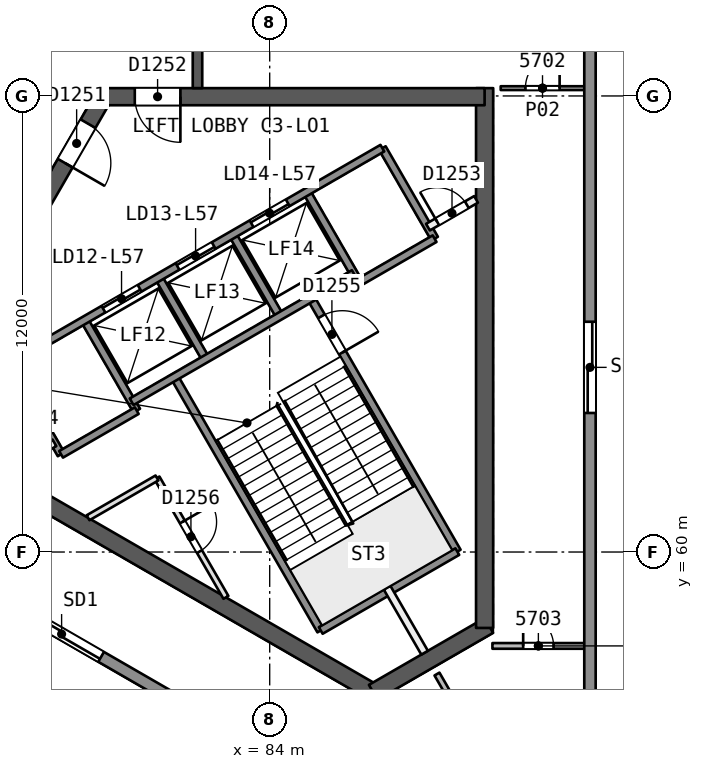
"""IFC4 building model, lengths in metres.
Left out: names, types, materials, properties, quantities, classifications, styles, units other than length and angle.
Written with IfcOpenShell. Run it as: python <this file> out.ifc"""

import sys

from ifc_helpers import new_model, si_unit, direction, frame, frame_2d, origin, place, context, subcontext, project, spatial, rectangle, extrude, element, fill, save


model = new_model("IFC4")
c1 = context("Model", 3, precision=1e-05, world=origin(), true_north=direction((0.0, 1.0)))
c2 = subcontext(c1, "Body", "Model", "MODEL_VIEW")
j1 = project(units=[si_unit("LENGTHUNIT", "METRE"), si_unit("PLANEANGLEUNIT", "RADIAN")], contexts=[c1])
p1 = place(None, origin())
s1 = spatial("IfcSite", under=j1, at=p1, CompositionType="ELEMENT")
p2 = place(p1, origin())
s2 = spatial("IfcBuilding", under=s1, at=p2, CompositionType="ELEMENT")
p3 = place(p2, frame((0.0, 0.0, 231.7)))
s3 = spatial("IfcBuildingStorey", under=s2, at=p3, CompositionType="ELEMENT", Elevation=231.7)
p4 = place(p3, frame((79.63, 71.981, 0.0), z_axis=(0.0, 0.0, 1.0), x_axis=(-0.500002171595, -0.86602415001, 0.0)))
e1 = element("IfcWall", 1, at=p4, inside=s3, PredefinedType="SHEAR", context=c2, shape_type="SweptSolid", body=[
    extrude(rectangle(XDim=10.25, YDim=0.45, at=frame_2d((5.125, 0.0))), origin(), (0.0, 0.0, 1.0), 3.7),
])
p5 = place(p4, frame((0.82, 0.0, 0.0)))
e2 = element("IfcOpeningElement", 2, at=p5, cuts=e1, PredefinedType="OPENING", context=c2, shape_type="SweptSolid", body=[
    extrude(rectangle(XDim=1.2, YDim=2.1, at=frame_2d((0.6, 1.05))), frame((0.0, 0.235, 0.0), z_axis=(0.0, -1.0, 0.0), x_axis=(1.0, 0.0, 0.0)), (0.0, 0.0, 1.0), 0.471),
])
p6 = place(p3, frame((74.617, 63.299, 0.0), z_axis=(0.0, 0.0, 1.0), x_axis=(0.86602594008, -0.499999071108, 0.0)))
e3 = element("IfcWall", 3, at=p6, inside=s3, PredefinedType="SHEAR", context=c2, shape_type="SweptSolid", body=[
    extrude(rectangle(XDim=14.108, YDim=0.45, at=frame_2d((7.054, 0.0))), origin(), (0.0, 0.0, 1.0), 3.7),
])
p7 = place(p3, frame((86.723, 56.31, 0.0), z_axis=(0.0, 0.0, 1.0), x_axis=(0.866042179588, 0.49997094233, 0.0)))
e4 = element("IfcWall", 4, at=p7, inside=s3, PredefinedType="SHEAR", context=c2, shape_type="SweptSolid", body=[
    extrude(rectangle(XDim=3.515, YDim=0.45, at=frame_2d((1.758, 0.0))), origin(), (0.0, 0.0, 1.0), 3.7),
])
p8 = place(p3, frame((89.655, 58.002, 0.0), z_axis=(0.0, 0.0, 1.0), x_axis=(0.0, 1.0, 0.0)))
e5 = element("IfcWall", 5, at=p8, inside=s3, PredefinedType="SHEAR", context=c2, shape_type="SweptSolid", body=[
    extrude(rectangle(XDim=14.204, YDim=0.45, at=frame_2d((7.102, 0.0))), origin(), (0.0, 0.0, 1.0), 3.7),
])
p9 = place(p3, frame((89.655, 71.981, 0.0), z_axis=(0.0, 0.0, 1.0), x_axis=(-1.0, 0.0, 0.0)))
e6 = element("IfcWall", 6, at=p9, inside=s3, PredefinedType="SHEAR", context=c2, shape_type="SweptSolid", body=[
    extrude(rectangle(XDim=10.155, YDim=0.45, at=frame_2d((5.078, 0.0))), origin(), (0.0, 0.0, 1.0), 3.7),
])
p10 = place(p9, frame((8.005, 0.0, 0.0)))
e7 = element("IfcOpeningElement", 7, at=p10, cuts=e6, PredefinedType="OPENING", context=c2, shape_type="SweptSolid", body=[
    extrude(rectangle(XDim=1.2, YDim=2.1, at=frame_2d((0.6, 1.05))), frame((0.0, 0.235, 0.0), z_axis=(0.0, -1.0, 0.0), x_axis=(1.0, 0.0, 0.0)), (0.0, 0.0, 1.0), 0.471),
])
p11 = place(p3, frame((82.1, 72.206, 0.0), z_axis=(0.0, 0.0, 1.0), x_axis=(0.0, 1.0, 0.0)))
e8 = element("IfcWall", 8, at=p11, inside=s3, PredefinedType="SHEAR", context=c2, shape_type="SweptSolid", body=[
    extrude(rectangle(XDim=15.588, YDim=0.25, at=frame_2d((7.794, 0.0))), origin(), (0.0, 0.0, 1.0), 3.3),
])
p12 = place(p11, frame((2.15, 0.0, 0.0)))
e9 = element("IfcOpeningElement", 9, at=p12, cuts=e8, PredefinedType="OPENING", context=c2, shape_type="SweptSolid", body=[
    extrude(rectangle(XDim=1.0, YDim=2.1, at=frame_2d((0.5, 1.05))), frame((0.0, 0.135, 0.0), z_axis=(0.0, -1.0, 0.0), x_axis=(1.0, 0.0, 0.0)), (0.0, 0.0, 1.0), 0.271),
])
p13 = place(p11, frame((7.662, 0.0, 0.0)))
e10 = element("IfcOpeningElement", 10, at=p13, cuts=e8, PredefinedType="OPENING", context=c2, shape_type="SweptSolid", body=[
    extrude(rectangle(XDim=1.2, YDim=2.4, at=frame_2d((0.6, 1.2))), frame((0.0, 0.135, 0.0), z_axis=(0.0, -1.0, 0.0), x_axis=(1.0, 0.0, 0.0)), (0.0, 0.0, 1.0), 0.271),
])
p14 = place(p11, frame((11.606, 0.0, 0.0)))
e11 = element("IfcOpeningElement", 11, at=p14, cuts=e8, PredefinedType="OPENING", context=c2, shape_type="SweptSolid", body=[
    extrude(rectangle(XDim=1.0, YDim=2.1, at=frame_2d((0.5, 1.05))), frame((0.0, 0.135, 0.0), z_axis=(0.0, -1.0, 0.0), x_axis=(1.0, 0.0, 0.0)), (0.0, 0.0, 1.0), 0.271),
])
p15 = place(p3, frame((90.079, 72.206, 0.0), z_axis=(0.0, 0.0, 1.0), x_axis=(1.0, 0.0, 0.0)))
e12 = element("IfcWall", 12, at=p15, inside=s3, PredefinedType="PARTITIONING", context=c2, shape_type="SweptSolid", body=[
    extrude(rectangle(XDim=2.2, YDim=0.1, at=frame_2d((1.1, 0.0))), origin(), (0.0, 0.0, 1.0), 3.3),
])
p16 = place(p15, frame((0.65, 0.0, 0.0)))
e13 = element("IfcOpeningElement", 13, at=p16, cuts=e12, PredefinedType="OPENING", context=c2, shape_type="SweptSolid", body=[
    extrude(rectangle(XDim=0.9, YDim=2.1, at=frame_2d((0.45, 1.05))), frame((0.0, 0.061, 0.0), z_axis=(0.0, -1.0, 0.0), x_axis=(1.0, 0.0, 0.0)), (0.0, 0.0, 1.0), 0.121),
])
p17 = place(p3, frame((89.861, 57.529, 0.0), z_axis=(0.0, 0.0, 1.0), x_axis=(1.0, 0.0, 0.0)))
e14 = element("IfcWall", 14, at=p17, inside=s3, PredefinedType="PARTITIONING", context=c2, shape_type="SweptSolid", body=[
    extrude(rectangle(XDim=2.418, YDim=0.15, at=frame_2d((1.209, 0.0))), origin(), (0.0, 0.0, 1.0), 3.3),
])
p18 = place(p17, frame((0.809, 0.0, 0.0)))
e15 = element("IfcOpeningElement", 15, at=p18, cuts=e14, PredefinedType="OPENING", context=c2, shape_type="SweptSolid", body=[
    extrude(rectangle(XDim=0.8, YDim=2.1, at=frame_2d((0.4, 1.05))), frame((0.0, 0.085, 0.0), z_axis=(0.0, -1.0, 0.0), x_axis=(1.0, 0.0, 0.0)), (0.0, 0.0, 1.0), 0.171),
])
p19 = place(p3, frame((88.402, 56.789, 0.0), z_axis=(0.0, 0.0, 1.0), x_axis=(0.500019299785, -0.866014260761, 0.0)))
e16 = element("IfcWall", 16, at=p19, inside=s3, PredefinedType="PARTITIONING", context=c2, shape_type="SweptSolid", body=[
    extrude(rectangle(XDim=3.465, YDim=0.15, at=frame_2d((1.732, 0.0))), origin(), (0.0, 0.0, 1.0), 3.3),
])
p20 = place(p3, frame((92.428, 105.059, 0.0), z_axis=(0.0, 0.0, 1.0), x_axis=(0.0, -1.0, 0.0)))
e17 = element("IfcWall", 17, at=p20, inside=s3, PredefinedType="SOLIDWALL", context=c2, shape_type="SweptSolid", body=[
    extrude(rectangle(XDim=50.118, YDim=0.3, at=frame_2d((25.059, 0.0))), origin(), (0.0, 0.0, 1.0), 3.3),
])
p21 = place(p20, frame((29.003, 0.0, 0.0)))
e18 = element("IfcOpeningElement", 18, at=p21, cuts=e17, PredefinedType="OPENING", context=c2, shape_type="SweptSolid", body=[
    extrude(rectangle(XDim=2.4, YDim=2.4, at=frame_2d((1.2, 1.2))), frame((0.0, 0.161, 0.0), z_axis=(0.0, -1.0, 0.0), x_axis=(1.0, 0.0, 0.0)), (0.0, 0.0, 1.0), 0.321),
])
p22 = place(p20, frame((39.0, 0.0, 0.0)))
e19 = element("IfcOpeningElement", 19, at=p22, cuts=e17, PredefinedType="OPENING", context=c2, shape_type="SweptSolid", body=[
    extrude(rectangle(XDim=2.4, YDim=2.4, at=frame_2d((1.2, 1.2))), frame((0.0, 0.161, 0.0), z_axis=(0.0, -1.0, 0.0), x_axis=(1.0, 0.0, 0.0)), (0.0, 0.0, 1.0), 0.321),
])
p23 = place(p20, frame((9.572, 0.0, 0.0)))
e20 = element("IfcOpeningElement", 20, at=p23, cuts=e17, PredefinedType="OPENING", context=c2, shape_type="SweptSolid", body=[
    extrude(rectangle(XDim=2.4, YDim=2.4, at=frame_2d((1.2, 1.2))), frame((0.0, 0.161, 0.0), z_axis=(0.0, -1.0, 0.0), x_axis=(1.0, 0.0, 0.0)), (0.0, 0.0, 1.0), 0.321),
])
p24 = place(p20, frame((23.391, 0.0, 0.0)))
e21 = element("IfcOpeningElement", 21, at=p24, cuts=e17, PredefinedType="OPENING", context=c2, shape_type="SweptSolid", body=[
    extrude(rectangle(XDim=2.4, YDim=2.4, at=frame_2d((1.2, 1.2))), frame((0.0, 0.161, 0.0), z_axis=(0.0, -1.0, 0.0), x_axis=(1.0, 0.0, 0.0)), (0.0, 0.0, 1.0), 0.321),
])
p25 = place(p3, frame((87.988, 52.377, 0.0), z_axis=(0.0, 0.0, 1.0), x_axis=(-0.866023992326, 0.500002444709, 0.0)))
e22 = element("IfcWall", 22, at=p25, inside=s3, PredefinedType="SOLIDWALL", context=c2, shape_type="SweptSolid", body=[
    extrude(rectangle(XDim=50.118, YDim=0.3, at=frame_2d((25.059, 0.0))), origin(), (0.0, 0.0, 1.0), 3.3),
])
p26 = place(p25, frame((24.015, 0.0, 0.0)))
e23 = element("IfcOpeningElement", 23, at=p26, cuts=e22, PredefinedType="OPENING", context=c2, shape_type="SweptSolid", body=[
    extrude(rectangle(XDim=2.4, YDim=2.4, at=frame_2d((1.2, 1.2))), frame((0.0, 0.161, 0.0), z_axis=(0.0, -1.0, 0.0), x_axis=(1.0, 0.0, 0.0)), (0.0, 0.0, 1.0), 0.321),
])
p27 = place(p25, frame((38.146, 0.0, 0.0)))
e24 = element("IfcOpeningElement", 24, at=p27, cuts=e22, PredefinedType="OPENING", context=c2, shape_type="SweptSolid", body=[
    extrude(rectangle(XDim=2.4, YDim=2.4, at=frame_2d((1.2, 1.2))), frame((0.0, 0.161, 0.0), z_axis=(0.0, -1.0, 0.0), x_axis=(1.0, 0.0, 0.0)), (0.0, 0.0, 1.0), 0.321),
])
p28 = place(p25, frame((9.727, 0.0, 0.0)))
e25 = element("IfcOpeningElement", 25, at=p28, cuts=e22, PredefinedType="OPENING", context=c2, shape_type="SweptSolid", body=[
    extrude(rectangle(XDim=2.4, YDim=2.4, at=frame_2d((1.2, 1.2))), frame((0.0, 0.161, 0.0), z_axis=(0.0, -1.0, 0.0), x_axis=(1.0, 0.0, 0.0)), (0.0, 0.0, 1.0), 0.321),
])
p29 = place(p3, frame((77.135, 64.952, 0.0), z_axis=(0.0, 0.0, 1.0), x_axis=(0.499996545922, -0.866027397988, 0.0)))
e26 = element("IfcWall", 26, at=p29, inside=s3, PredefinedType="SOLIDWALL", context=c2, shape_type="SweptSolid", body=[
    extrude(rectangle(XDim=2.75, YDim=0.2, at=frame_2d((1.375, 0.0))), origin(), (0.0, 0.0, 1.0), 3.3),
])
p30 = place(p3, frame((81.034, 61.949, 0.0), z_axis=(0.0, 0.0, 1.0), x_axis=(0.499945732631, -0.866056732798, 0.0)))
e27 = element("IfcWall", 27, at=p30, inside=s3, PredefinedType="PARTITIONING", context=c2, shape_type="SweptSolid", body=[
    extrude(rectangle(XDim=3.628, YDim=0.15, at=frame_2d((1.814, 0.0))), origin(), (0.0, 0.0, 1.0), 3.3),
])
p31 = place(p30, frame((1.337, 0.0, 0.0)))
e28 = element("IfcOpeningElement", 28, at=p31, cuts=e27, PredefinedType="OPENING", context=c2, shape_type="SweptSolid", body=[
    extrude(rectangle(XDim=0.9, YDim=2.1, at=frame_2d((0.45, 1.05))), frame((0.0, 0.085, 0.0), z_axis=(0.0, -1.0, 0.0), x_axis=(1.0, 0.0, 0.0)), (0.0, 0.0, 1.0), 0.171),
])
p32 = place(p3, frame((79.127, 66.102, 0.0), z_axis=(0.0, 0.0, 1.0), x_axis=(0.499996545922, -0.866027397988, 0.0)))
e29 = element("IfcWall", 29, at=p32, inside=s3, PredefinedType="SOLIDWALL", context=c2, shape_type="SweptSolid", body=[
    extrude(rectangle(XDim=2.75, YDim=0.2, at=frame_2d((1.375, 0.0))), origin(), (0.0, 0.0, 1.0), 3.3),
])
p33 = place(p3, frame((81.493, 64.604, 0.0), z_axis=(0.0, 0.0, 1.0), x_axis=(0.500006057782, -0.866021906294, 0.0)))
e30 = element("IfcWall", 30, at=p33, inside=s3, PredefinedType="SOLIDWALL", context=c2, shape_type="SweptSolid", body=[
    extrude(rectangle(XDim=7.7, YDim=0.2, at=frame_2d((3.85, 0.0))), origin(), (0.0, 0.0, 1.0), 3.3),
])
p34 = place(p3, frame((81.076, 67.227, 0.0), z_axis=(0.0, 0.0, 1.0), x_axis=(0.50000366821, -0.866023285932, 0.0)))
e31 = element("IfcWall", 31, at=p34, inside=s3, PredefinedType="SOLIDWALL", context=c2, shape_type="SweptSolid", body=[
    extrude(rectangle(XDim=2.48, YDim=0.2, at=frame_2d((1.24, 0.0))), origin(), (0.0, 0.0, 1.0), 3.3),
])
p35 = place(p3, frame((87.09, 59.06, 0.0), z_axis=(0.0, 0.0, 1.0), x_axis=(0.500011643316, -0.866018681408, 0.0)))
e32 = element("IfcWall", 32, at=p35, inside=s3, PredefinedType="PARTITIONING", context=c2, shape_type="SweptSolid", body=[
    extrude(rectangle(XDim=1.973, YDim=0.2, at=frame_2d((0.987, 0.0))), origin(), (0.0, 0.0, 1.0), 3.3),
])
p36 = place(p3, frame((83.024, 68.352, 0.0), z_axis=(0.0, 0.0, 1.0), x_axis=(0.50000366821, -0.866023285932, 0.0)))
e33 = element("IfcWall", 33, at=p36, inside=s3, PredefinedType="SOLIDWALL", context=c2, shape_type="SweptSolid", body=[
    extrude(rectangle(XDim=2.48, YDim=0.2, at=frame_2d((1.24, 0.0))), origin(), (0.0, 0.0, 1.0), 3.3),
])
p37 = place(p3, frame((85.087, 66.679, 0.0), z_axis=(0.0, 0.0, 1.0), x_axis=(0.500019787375, -0.866013979237, 0.0)))
e34 = element("IfcWall", 34, at=p37, inside=s3, PredefinedType="SOLIDWALL", context=c2, shape_type="SweptSolid", body=[
    extrude(rectangle(XDim=7.7, YDim=0.2, at=frame_2d((3.85, 0.0))), origin(), (0.0, 0.0, 1.0), 3.3),
])
p38 = place(p37, frame((0.55, 0.0, 0.0)))
e35 = element("IfcOpeningElement", 35, at=p38, cuts=e34, PredefinedType="OPENING", context=c2, shape_type="SweptSolid", body=[
    extrude(rectangle(XDim=1.1, YDim=2.1, at=frame_2d((0.55, 1.05))), frame((0.0, 0.11, 0.0), z_axis=(0.0, -1.0, 0.0), x_axis=(1.0, 0.0, 0.0)), (0.0, 0.0, 1.0), 0.221),
])
for number, where, z_axis, x_axis in (
    (36, (84.973, 69.477, 0.0), (0.0, 0.0, 1.0), (0.5, -0.866, 0.0)),
    (37, (86.965, 70.626, 0.0), (0.0, 0.0, 1.0), (0.5, -0.866, 0.0)),
):
    element("IfcWall", number, at=place(p3, frame(where, z_axis=z_axis, x_axis=x_axis)), inside=s3, PredefinedType="SOLIDWALL", context=c2, shape_type="SweptSolid", body=[
        extrude(rectangle(XDim=2.75, YDim=0.2, at=frame_2d((1.375, 0.0))), origin(), (0.0, 0.0, 1.0), 3.3),
    ])
p39 = place(p3, frame((77.135, 64.952, 0.0), z_axis=(0.0, 0.0, 1.0), x_axis=(0.866031916153, 0.499988720078, 0.0)))
e38 = element("IfcWall", 38, at=p39, inside=s3, PredefinedType="SOLIDWALL", context=c2, shape_type="SweptSolid", body=[
    extrude(rectangle(XDim=11.35, YDim=0.2, at=frame_2d((5.675, 0.0))), origin(), (0.0, 0.0, 1.0), 3.3),
])
p40 = place(p39, frame((2.875, 0.0, 0.0)))
e39 = element("IfcOpeningElement", 39, at=p40, cuts=e38, PredefinedType="OPENING", context=c2, shape_type="SweptSolid", body=[
    extrude(rectangle(XDim=1.1, YDim=2.1, at=frame_2d((0.55, 1.05))), frame((0.0, 0.11, 0.0), z_axis=(0.0, -1.0, 0.0), x_axis=(1.0, 0.0, 0.0)), (0.0, 0.0, 1.0), 0.221),
])
p41 = place(p39, frame((5.125, 0.0, 0.0)))
e40 = element("IfcOpeningElement", 40, at=p41, cuts=e38, PredefinedType="OPENING", context=c2, shape_type="SweptSolid", body=[
    extrude(rectangle(XDim=1.1, YDim=2.1, at=frame_2d((0.55, 1.05))), frame((0.0, 0.11, 0.0), z_axis=(0.0, -1.0, 0.0), x_axis=(1.0, 0.0, 0.0)), (0.0, 0.0, 1.0), 0.221),
])
p42 = place(p39, frame((7.375, 0.0, 0.0)))
e41 = element("IfcOpeningElement", 41, at=p42, cuts=e38, PredefinedType="OPENING", context=c2, shape_type="SweptSolid", body=[
    extrude(rectangle(XDim=1.1, YDim=2.1, at=frame_2d((0.55, 1.05))), frame((0.0, 0.11, 0.0), z_axis=(0.0, -1.0, 0.0), x_axis=(1.0, 0.0, 0.0)), (0.0, 0.0, 1.0), 0.221),
])
p43 = place(p3, frame((77.07, 62.143, 0.0), z_axis=(0.0, 0.0, 1.0), x_axis=(0.866013036001, 0.500021421018, 0.0)))
e42 = element("IfcWall", 42, at=p43, inside=s3, PredefinedType="PARTITIONING", context=c2, shape_type="SweptSolid", body=[
    extrude(rectangle(XDim=1.461, YDim=0.2, at=frame_2d((0.73, 0.0))), origin(), (0.0, 0.0, 1.0), 3.3),
])
p44 = place(p43, frame((0.281, 0.0, 0.0)))
e43 = element("IfcOpeningElement", 43, at=p44, cuts=e42, PredefinedType="OPENING", context=c2, shape_type="SweptSolid", body=[
    extrude(rectangle(XDim=0.9, YDim=2.1, at=frame_2d((0.45, 1.05))), frame((0.0, 0.11, 0.0), z_axis=(0.0, -1.0, 0.0), x_axis=(1.0, 0.0, 0.0)), (0.0, 0.0, 1.0), 0.221),
])
p45 = place(p3, frame((88.165, 68.548, 0.0), z_axis=(0.0, 0.0, 1.0), x_axis=(0.866013036001, 0.500021421018, 0.0)))
e44 = element("IfcWall", 44, at=p45, inside=s3, PredefinedType="PARTITIONING", context=c2, shape_type="SweptSolid", body=[
    extrude(rectangle(XDim=1.461, YDim=0.2, at=frame_2d((0.73, 0.0))), origin(), (0.0, 0.0, 1.0), 3.3),
])
p46 = place(p45, frame((0.281, 0.0, 0.0)))
e45 = element("IfcOpeningElement", 45, at=p46, cuts=e44, PredefinedType="OPENING", context=c2, shape_type="SweptSolid", body=[
    extrude(rectangle(XDim=0.9, YDim=2.1, at=frame_2d((0.45, 1.05))), frame((0.0, 0.11, 0.0), z_axis=(0.0, -1.0, 0.0), x_axis=(1.0, 0.0, 0.0)), (0.0, 0.0, 1.0), 0.221),
])
p47 = place(p3, frame((80.367, 63.954, 0.0), z_axis=(0.0, 0.0, 1.0), x_axis=(0.866026575979, 0.499997969693, 0.0)))
e46 = element("IfcWall", 46, at=p47, inside=s3, PredefinedType="SOLIDWALL", context=c2, shape_type="SweptSolid", body=[
    extrude(rectangle(XDim=6.75, YDim=0.2, at=frame_2d((3.375, 0.0))), origin(), (0.0, 0.0, 1.0), 3.3),
])
p48 = place(p3, frame((78.51, 62.57, 0.0), z_axis=(0.0, 0.0, 1.0), x_axis=(0.866053019151, 0.499952165731, 0.0)))
e47 = element("IfcWall", 47, at=p48, inside=s3, PredefinedType="SOLIDWALL", context=c2, shape_type="SweptSolid", body=[
    extrude(rectangle(XDim=2.3, YDim=0.2, at=frame_2d((1.15, 0.0))), origin(), (0.0, 0.0, 1.0), 3.3),
])
p49 = place(p3, frame((86.348, 67.095, 0.0), z_axis=(0.0, 0.0, 1.0), x_axis=(0.86602648383, 0.499998129301, 0.0)))
e48 = element("IfcWall", 48, at=p49, inside=s3, PredefinedType="SOLIDWALL", context=c2, shape_type="SweptSolid", body=[
    extrude(rectangle(XDim=2.3, YDim=0.2, at=frame_2d((1.15, 0.0))), origin(), (0.0, 0.0, 1.0), 3.3),
])
p50 = place(p3, frame((79.22, 60.901, 0.0), z_axis=(0.0, 0.0, 1.0), x_axis=(0.866040030748, 0.499974664501, 0.0)))
e49 = element("IfcWall", 49, at=p50, inside=s3, PredefinedType="PARTITIONING", context=c2, shape_type="SweptSolid", body=[
    extrude(rectangle(XDim=2.095, YDim=0.15, at=frame_2d((1.047, 0.0))), origin(), (0.0, 0.0, 1.0), 3.3),
])
p51 = place(p3, frame((85.343, 57.935, 0.0), z_axis=(0.0, 0.0, 1.0), x_axis=(0.866004344652, 0.500036473714, 0.0)))
e50 = element("IfcWall", 50, at=p51, inside=s3, PredefinedType="SOLIDWALL", context=c2, shape_type="SweptSolid", body=[
    extrude(rectangle(XDim=4.15, YDim=0.2, at=frame_2d((2.075, 0.0))), origin(), (0.0, 0.0, 1.0), 3.3),
])
p52 = place(p3, frame((77.798, 73.154, 0.0), z_axis=(0.0, 0.0, 1.0), x_axis=(0.866041268327, 0.499972520799, 0.0)))
e51 = element("IfcWall", 51, at=p52, inside=s3, PredefinedType="PARTITIONING", context=c2, shape_type="SweptSolid", body=[
    extrude(rectangle(XDim=2.0, YDim=0.1, at=frame_2d((1.0, 0.0))), origin(), (0.0, 0.0, 1.0), 3.3),
])
p53 = place(p16, origin())
e52 = element("IfcDoor", 52, at=p53, inside=s3, OperationType="SINGLE_SWING_RIGHT", PredefinedType="NOTDEFINED", context=c2, shape_type="SweptSolid", body=[
    extrude(rectangle(XDim=0.9, YDim=2.1, at=frame_2d((0.45, 1.05))), frame((0.0, 0.025, 0.0), z_axis=(0.0, -1.0, 0.0), x_axis=(1.0, 0.0, 0.0)), (0.0, 0.0, 1.0), 0.05),
])
fill(e13, e52)
p54 = place(p18, origin())
e53 = element("IfcDoor", 53, at=p54, inside=s3, OperationType="SINGLE_SWING_LEFT", PredefinedType="NOTDEFINED", context=c2, shape_type="SweptSolid", body=[
    extrude(rectangle(XDim=0.8, YDim=2.1, at=frame_2d((0.4, 1.05))), frame((0.0, 0.025, 0.0), z_axis=(0.0, -1.0, 0.0), x_axis=(1.0, 0.0, 0.0)), (0.0, 0.0, 1.0), 0.05),
])
fill(e15, e53)
p55 = place(p22, origin())
e54 = element("IfcDoor", 54, at=p55, inside=s3, OperationType="SLIDING_TO_RIGHT", PredefinedType="NOTDEFINED", context=c2, shape_type="SweptSolid", body=[
    extrude(rectangle(XDim=2.4, YDim=2.4, at=frame_2d((1.2, 1.2))), frame((0.0, 0.025, 0.0), z_axis=(0.0, -1.0, 0.0), x_axis=(1.0, 0.0, 0.0)), (0.0, 0.0, 1.0), 0.05),
])
fill(e19, e54)
p56 = place(p28, origin())
e55 = element("IfcDoor", 55, at=p56, inside=s3, OperationType="SLIDING_TO_LEFT", PredefinedType="NOTDEFINED", context=c2, shape_type="SweptSolid", body=[
    extrude(rectangle(XDim=2.4, YDim=2.4, at=frame_2d((1.2, 1.2))), frame((0.0, 0.025, 0.0), z_axis=(0.0, -1.0, 0.0), x_axis=(1.0, 0.0, 0.0)), (0.0, 0.0, 1.0), 0.05),
])
fill(e25, e55)
p57 = place(p5, origin())
e56 = element("IfcDoor", 56, at=p57, inside=s3, OperationType="SINGLE_SWING_RIGHT", PredefinedType="NOTDEFINED", context=c2, shape_type="SweptSolid", body=[
    extrude(rectangle(XDim=1.2, YDim=2.1, at=frame_2d((0.6, 1.05))), frame((0.0, 0.025, 0.0), z_axis=(0.0, -1.0, 0.0), x_axis=(1.0, 0.0, 0.0)), (0.0, 0.0, 1.0), 0.05),
])
fill(e2, e56)
p58 = place(p10, origin())
e57 = element("IfcDoor", 57, at=p58, inside=s3, OperationType="SINGLE_SWING_LEFT", PredefinedType="NOTDEFINED", context=c2, shape_type="SweptSolid", body=[
    extrude(rectangle(XDim=1.2, YDim=2.1, at=frame_2d((0.6, 1.05))), frame((0.0, 0.025, 0.0), z_axis=(0.0, -1.0, 0.0), x_axis=(1.0, 0.0, 0.0)), (0.0, 0.0, 1.0), 0.05),
])
fill(e7, e57)
p59 = place(p40, origin())
e58 = element("IfcDoor", 58, at=p59, inside=s3, OperationType="SLIDING_TO_LEFT", PredefinedType="NOTDEFINED", context=c2, shape_type="SweptSolid", body=[
    extrude(rectangle(XDim=1.1, YDim=2.1, at=frame_2d((0.55, 1.05))), frame((0.0, 0.025, 0.0), z_axis=(0.0, -1.0, 0.0), x_axis=(1.0, 0.0, 0.0)), (0.0, 0.0, 1.0), 0.05),
])
fill(e39, e58)
p60 = place(p41, origin())
e59 = element("IfcDoor", 59, at=p60, inside=s3, OperationType="SLIDING_TO_RIGHT", PredefinedType="NOTDEFINED", context=c2, shape_type="SweptSolid", body=[
    extrude(rectangle(XDim=1.1, YDim=2.1, at=frame_2d((0.55, 1.05))), frame((0.0, 0.025, 0.0), z_axis=(0.0, -1.0, 0.0), x_axis=(1.0, 0.0, 0.0)), (0.0, 0.0, 1.0), 0.05),
])
fill(e40, e59)
p61 = place(p42, origin())
e60 = element("IfcDoor", 60, at=p61, inside=s3, OperationType="SLIDING_TO_LEFT", PredefinedType="NOTDEFINED", context=c2, shape_type="SweptSolid", body=[
    extrude(rectangle(XDim=1.1, YDim=2.1, at=frame_2d((0.55, 1.05))), frame((0.0, 0.025, 0.0), z_axis=(0.0, -1.0, 0.0), x_axis=(1.0, 0.0, 0.0)), (0.0, 0.0, 1.0), 0.05),
])
fill(e41, e60)
p62 = place(p46, origin())
e61 = element("IfcDoor", 61, at=p62, inside=s3, OperationType="SINGLE_SWING_LEFT", PredefinedType="NOTDEFINED", context=c2, shape_type="SweptSolid", body=[
    extrude(rectangle(XDim=0.9, YDim=2.1, at=frame_2d((0.45, 1.05))), frame((0.0, 0.025, 0.0), z_axis=(0.0, -1.0, 0.0), x_axis=(1.0, 0.0, 0.0)), (0.0, 0.0, 1.0), 0.05),
])
fill(e45, e61)
p63 = place(p38, origin())
e62 = element("IfcDoor", 62, at=p63, inside=s3, OperationType="SINGLE_SWING_RIGHT", PredefinedType="NOTDEFINED", context=c2, shape_type="SweptSolid", body=[
    extrude(rectangle(XDim=1.1, YDim=2.1, at=frame_2d((0.55, 1.05))), frame((0.0, 0.025, 0.0), z_axis=(0.0, -1.0, 0.0), x_axis=(1.0, 0.0, 0.0)), (0.0, 0.0, 1.0), 0.05),
])
fill(e35, e62)
p64 = place(p31, origin())
e63 = element("IfcDoor", 63, at=p64, inside=s3, OperationType="SINGLE_SWING_LEFT", PredefinedType="NOTDEFINED", context=c2, shape_type="SweptSolid", body=[
    extrude(rectangle(XDim=0.9, YDim=2.1, at=frame_2d((0.45, 1.05))), frame((0.0, 0.025, 0.0), z_axis=(0.0, -1.0, 0.0), x_axis=(1.0, 0.0, 0.0)), (0.0, 0.0, 1.0), 0.05),
])
fill(e28, e63)
save(model, sys.argv[1])
